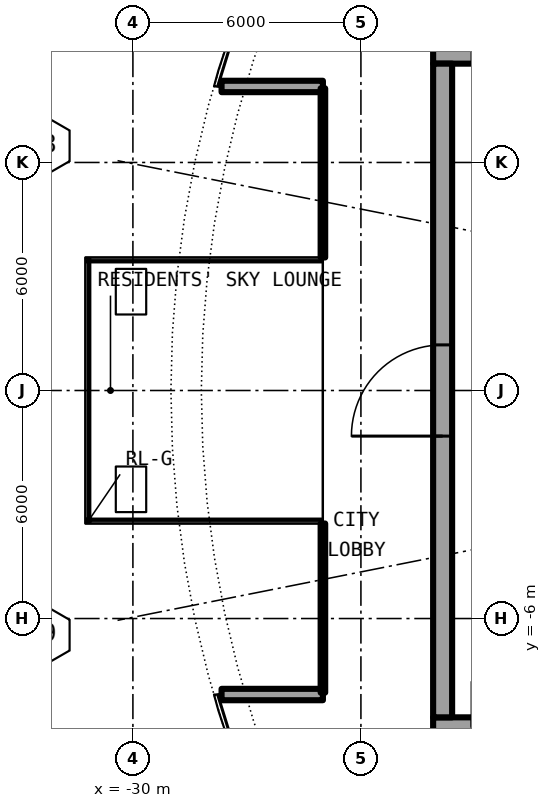
"""IFC4 building model, lengths in metres.
Left out: names, types, materials, properties, quantities, classifications, styles, units other than length and angle.
Written with IfcOpenShell. Run it as: python <this file> out.ifc"""

import sys

from ifc_helpers import new_model, si_unit, direction, frame, frame_2d, origin, place, context, subcontext, project, spatial, rectangle, extrude, element, fill, save


model = new_model("IFC4")
c1 = context("Model", 3, precision=1e-05, world=origin(), true_north=direction((0.0, 1.0)))
c2 = subcontext(c1, "Body", "Model", "MODEL_VIEW")
j1 = project(units=[si_unit("LENGTHUNIT", "METRE"), si_unit("PLANEANGLEUNIT", "RADIAN")], contexts=[c1])
p1 = place(None, origin())
s1 = spatial("IfcSite", under=j1, at=p1, CompositionType="ELEMENT")
p2 = place(p1, origin())
s2 = spatial("IfcBuilding", under=s1, at=p2, CompositionType="ELEMENT")
p3 = place(p2, frame((0.0, 0.0, 179.9)))
s3 = spatial("IfcBuildingStorey", under=s2, at=p3, CompositionType="ELEMENT", Elevation=179.9)
for number, where, z_axis, x_axis in (
    (1, (-25.0, 8.0, 0.0), (0.0, 0.0, 1.0), (-1.0, 0.0, 0.0)),
    (2, (-25.0, -8.0, 0.0), (0.0, 0.0, 1.0), (-1.0, 0.0, 0.0)),
):
    element("IfcWall", number, at=place(p3, frame(where, z_axis=z_axis, x_axis=x_axis)), inside=s3, PredefinedType="SOLIDWALL", context=c2, shape_type="SweptSolid", body=[
        extrude(rectangle(XDim=2.667, YDim=0.3, at=frame_2d((1.333, 0.0))), origin(), (0.0, 0.0, 1.0), 5.7),
    ])
p4 = place(p3, frame((-22.1, -8.85, 0.0), z_axis=(0.0, 0.0, 1.0), x_axis=(1.0, 0.0, 0.0)))
e3 = element("IfcWall", 3, at=p4, inside=s3, PredefinedType="SHEAR", context=c2, shape_type="SweptSolid", body=[
    extrude(rectangle(XDim=13.6, YDim=0.5, at=frame_2d((6.8, 0.0))), origin(), (0.0, 0.0, 1.0), 6.1),
])
p5 = place(p4, frame((1.025, 0.0, 0.0)))
e4 = element("IfcOpeningElement", 4, at=p5, cuts=e3, PredefinedType="OPENING", context=c2, shape_type="SweptSolid", body=[
    extrude(rectangle(XDim=1.2, YDim=2.3, at=frame_2d((0.6, 1.15))), frame((0.0, 0.26, 0.0), z_axis=(0.0, -1.0, 0.0), x_axis=(1.0, 0.0, 0.0)), (0.0, 0.0, 1.0), 0.52),
])
p6 = place(p3, frame((-8.5, 8.85, 0.0), z_axis=(0.0, 0.0, 1.0), x_axis=(-1.0, 0.0, 0.0)))
e5 = element("IfcWall", 5, at=p6, inside=s3, PredefinedType="SHEAR", context=c2, shape_type="SweptSolid", body=[
    extrude(rectangle(XDim=13.6, YDim=0.5, at=frame_2d((6.8, 0.0))), origin(), (0.0, 0.0, 1.0), 6.1),
])
p7 = place(p6, frame((11.375, 0.0, 0.0)))
e6 = element("IfcOpeningElement", 6, at=p7, cuts=e5, PredefinedType="OPENING", context=c2, shape_type="SweptSolid", body=[
    extrude(rectangle(XDim=1.2, YDim=2.3, at=frame_2d((0.6, 1.15))), frame((0.0, 0.26, 0.0), z_axis=(0.0, -1.0, 0.0), x_axis=(1.0, 0.0, 0.0)), (0.0, 0.0, 1.0), 0.52),
])
p8 = place(p3, frame((-21.85, -8.6, 0.0), z_axis=(0.0, 0.0, 1.0), x_axis=(0.0, 1.0, 0.0)))
e7 = element("IfcWall", 7, at=p8, inside=s3, PredefinedType="SHEAR", context=c2, shape_type="SweptSolid", body=[
    extrude(rectangle(XDim=17.2, YDim=0.5, at=frame_2d((8.6, 0.0))), origin(), (0.0, 0.0, 1.0), 6.1),
])
p9 = place(p8, frame((7.4, 0.0, 0.0)))
e8 = element("IfcOpeningElement", 8, at=p9, cuts=e7, PredefinedType="OPENING", context=c2, shape_type="SweptSolid", body=[
    extrude(rectangle(XDim=2.4, YDim=2.3, at=frame_2d((1.2, 1.15))), frame((0.0, 0.26, 0.0), z_axis=(0.0, -1.0, 0.0), x_axis=(1.0, 0.0, 0.0)), (0.0, 0.0, 1.0), 0.52),
])
p10 = place(p3, frame((-25.0, 3.5, 0.0), z_axis=(0.0, 0.0, 1.0), x_axis=(0.0, 1.0, 0.0)))
e9 = element("IfcWall", 9, at=p10, inside=s3, PredefinedType="PARTITIONING", context=c2, shape_type="SweptSolid", body=[
    extrude(rectangle(XDim=4.45, YDim=0.12, at=frame_2d((2.225, 0.0))), origin(), (0.0, 0.0, 1.0), 5.7),
])
p11 = place(p10, frame((0.4, 0.0, 0.1)))
e10 = element("IfcOpeningElement", 10, at=p11, cuts=e9, PredefinedType="OPENING", context=c2, shape_type="SweptSolid", body=[
    extrude(rectangle(XDim=3.6, YDim=5.35, at=frame_2d((1.8, 2.675))), frame((0.0, 0.07, 0.0), z_axis=(0.0, -1.0, 0.0), x_axis=(1.0, 0.0, 0.0)), (0.0, 0.0, 1.0), 0.14),
])
p12 = place(p3, frame((-25.0, -3.5, 0.0), z_axis=(0.0, 0.0, 1.0), x_axis=(0.0, -1.0, 0.0)))
e11 = element("IfcWall", 11, at=p12, inside=s3, PredefinedType="PARTITIONING", context=c2, shape_type="SweptSolid", body=[
    extrude(rectangle(XDim=4.45, YDim=0.12, at=frame_2d((2.225, 0.0))), origin(), (0.0, 0.0, 1.0), 5.7),
])
p13 = place(p12, frame((0.4, 0.0, 0.1)))
e12 = element("IfcOpeningElement", 12, at=p13, cuts=e11, PredefinedType="OPENING", context=c2, shape_type="SweptSolid", body=[
    extrude(rectangle(XDim=3.6, YDim=5.35, at=frame_2d((1.8, 2.675))), frame((0.0, 0.07, 0.0), z_axis=(0.0, -1.0, 0.0), x_axis=(1.0, 0.0, 0.0)), (0.0, 0.0, 1.0), 0.14),
])
p14 = place(p9, origin())
e13 = element("IfcDoor", 13, at=p14, inside=s3, OperationType="SINGLE_SWING_LEFT", PredefinedType="DOOR", context=c2, shape_type="SweptSolid", body=[
    extrude(rectangle(XDim=2.4, YDim=2.3, at=frame_2d((1.2, 1.15))), frame((0.0, 0.025, 0.0), z_axis=(0.0, -1.0, 0.0), x_axis=(1.0, 0.0, 0.0)), (0.0, 0.0, 1.0), 0.05),
])
fill(e8, e13)
p15 = place(p11, origin())
e14 = element("IfcWindow", 14, at=p15, inside=s3, PartitioningType="SINGLE_PANEL", PredefinedType="WINDOW", context=c2, shape_type="SweptSolid", body=[
    extrude(rectangle(XDim=3.6, YDim=5.35, at=frame_2d((1.8, 2.675))), frame((0.0, 0.03, 0.0), z_axis=(0.0, -1.0, 0.0), x_axis=(1.0, 0.0, 0.0)), (0.0, 0.0, 1.0), 0.06),
])
fill(e10, e14)
p16 = place(p13, origin())
e15 = element("IfcWindow", 15, at=p16, inside=s3, PartitioningType="SINGLE_PANEL", PredefinedType="WINDOW", context=c2, shape_type="SweptSolid", body=[
    extrude(rectangle(XDim=3.6, YDim=5.35, at=frame_2d((1.8, 2.675))), frame((0.0, 0.03, 0.0), z_axis=(0.0, -1.0, 0.0), x_axis=(1.0, 0.0, 0.0)), (0.0, 0.0, 1.0), 0.06),
])
fill(e12, e15)
save(model, sys.argv[1])
